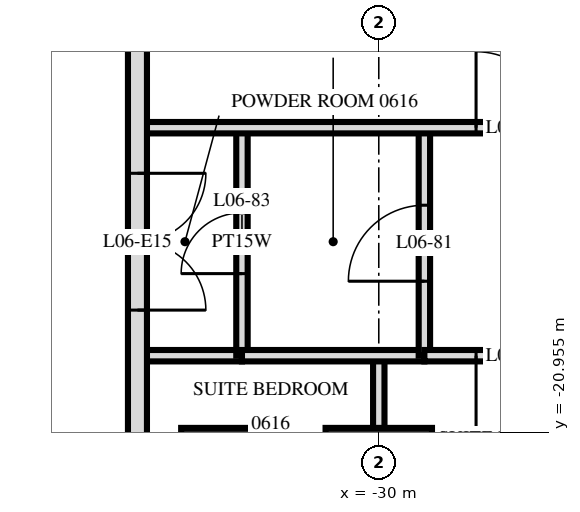
"""IFC4 building model, lengths in metres.
Left out: names, types, materials, properties, quantities, classifications, styles, units other than length and angle.
Written with IfcOpenShell. Run it as: python <this file> out.ifc"""

import sys

from ifc_helpers import new_model, si_unit, direction, frame, frame_2d, origin, origin_2d, place, context, subcontext, project, spatial, rectangle, extrude, element, fill, save


model = new_model("IFC4")
c1 = context("Model", 3, precision=1e-05, world=origin(), true_north=direction((0.0, 1.0)))
c2 = subcontext(c1, "Body", "Model", "MODEL_VIEW")
j1 = project(units=[si_unit("LENGTHUNIT", "METRE"), si_unit("PLANEANGLEUNIT", "RADIAN")], contexts=[c1])
p1 = place(None, origin())
s1 = spatial("IfcSite", under=j1, at=p1, CompositionType="ELEMENT")
p2 = place(p1, origin())
s2 = spatial("IfcBuilding", under=s1, at=p2, CompositionType="ELEMENT")
p3 = place(p2, frame((0.0, 0.0, 31.2)))
s3 = spatial("IfcBuildingStorey", under=s2, at=p3, CompositionType="ELEMENT", Elevation=31.2)
p4 = place(p3, frame((-32.1, -21.6, 0.0), z_axis=(0.0, 0.0, 1.0), x_axis=(0.0, 1.0, 0.0)))
e1 = element("IfcColumn", 1, at=p4, inside=s3, PredefinedType="COLUMN", context=c2, shape_type="SweptSolid", body=[
    extrude(rectangle(XDim=1.4, YDim=1.0, at=origin_2d()), origin(), (0.0, 0.0, 1.0), 3.6),
])
p5 = place(p3, frame((-30.0, -21.6, 0.0), z_axis=(0.0, 0.0, 1.0), x_axis=(1.0, 0.0, 0.0)))
e2 = element("IfcColumn", 2, at=p5, inside=s3, PredefinedType="COLUMN", context=c2, shape_type="SweptSolid", body=[
    extrude(rectangle(XDim=1.4, YDim=1.4, at=origin_2d()), origin(), (0.0, 0.0, 1.0), 3.6),
])
p6 = place(p3, frame((-33.175, -3.325, 0.0), z_axis=(0.0, 0.0, 1.0), x_axis=(0.0, -1.0, 0.0)))
e3 = element("IfcWall", 3, at=p6, inside=s3, PredefinedType="SOLIDWALL", context=c2, shape_type="SweptSolid", body=[
    extrude(rectangle(XDim=21.551, YDim=0.25, at=frame_2d((10.775, 0.0))), origin(), (0.0, 0.0, 1.0), 3.32),
])
p7 = place(p6, frame((7.025, 0.0, 0.0)))
e4 = element("IfcOpeningElement", 4, at=p7, cuts=e3, PredefinedType="OPENING", context=c2, shape_type="SweptSolid", body=[
    extrude(rectangle(XDim=1.8, YDim=2.4, at=frame_2d((0.9, 1.2))), frame((0.0, 0.135, 0.0), z_axis=(0.0, -1.0, 0.0), x_axis=(1.0, 0.0, 0.0)), (0.0, 0.0, 1.0), 0.27),
])
p8 = place(p6, frame((14.225, 0.0, 0.0)))
e5 = element("IfcOpeningElement", 5, at=p8, cuts=e3, PredefinedType="OPENING", context=c2, shape_type="SweptSolid", body=[
    extrude(rectangle(XDim=1.8, YDim=2.4, at=frame_2d((0.9, 1.2))), frame((0.0, 0.135, 0.0), z_axis=(0.0, -1.0, 0.0), x_axis=(1.0, 0.0, 0.0)), (0.0, 0.0, 1.0), 0.27),
])
p9 = place(p6, frame((18.875, 0.0, 0.0)))
e6 = element("IfcOpeningElement", 6, at=p9, cuts=e3, PredefinedType="OPENING", context=c2, shape_type="SweptSolid", body=[
    extrude(rectangle(XDim=1.8, YDim=2.4, at=frame_2d((0.9, 1.2))), frame((0.0, 0.135, 0.0), z_axis=(0.0, -1.0, 0.0), x_axis=(1.0, 0.0, 0.0)), (0.0, 0.0, 1.0), 0.27),
])
p10 = place(p3, frame((-29.4, -19.95, 0.0), z_axis=(0.0, 0.0, 1.0), x_axis=(0.0, 1.0, 0.0)))
e7 = element("IfcWall", 7, at=p10, inside=s3, PredefinedType="PARTITIONING", context=c2, shape_type="SweptSolid", body=[
    extrude(rectangle(XDim=3.0, YDim=0.15, at=frame_2d((1.5, 0.0))), origin(), (0.0, 0.0, 1.0), 3.32),
])
p11 = place(p10, frame((0.98, 0.0, 0.0)))
e8 = element("IfcOpeningElement", 8, at=p11, cuts=e7, PredefinedType="OPENING", context=c2, shape_type="SweptSolid", body=[
    extrude(rectangle(XDim=1.0, YDim=2.1, at=frame_2d((0.5, 1.05))), frame((0.0, 0.085, 0.0), z_axis=(0.0, -1.0, 0.0), x_axis=(1.0, 0.0, 0.0)), (0.0, 0.0, 1.0), 0.17),
])
p12 = place(p3, frame((-30.0, -28.978, 0.0), z_axis=(0.0, 0.0, 1.0), x_axis=(0.0, 1.0, 0.0)))
e9 = element("IfcWall", 9, at=p12, inside=s3, PredefinedType="PARTITIONING", context=c2, shape_type="SweptSolid", body=[
    extrude(rectangle(XDim=9.028, YDim=0.15, at=frame_2d((4.514, 0.0))), origin(), (0.0, 0.0, 1.0), 3.32),
])
p13 = place(p12, frame((3.987, 0.0, 0.0)))
e10 = element("IfcOpeningElement", 10, at=p13, cuts=e9, PredefinedType="OPENING", context=c2, shape_type="SweptSolid", body=[
    extrude(rectangle(XDim=0.9, YDim=2.1, at=frame_2d((0.45, 1.05))), frame((0.0, 0.085, 0.0), z_axis=(0.0, -1.0, 0.0), x_axis=(1.0, 0.0, 0.0)), (0.0, 0.0, 1.0), 0.17),
])
p14 = place(p3, frame((-31.8, -19.95, 0.0), z_axis=(0.0, 0.0, 1.0), x_axis=(0.0, 1.0, 0.0)))
e11 = element("IfcWall", 11, at=p14, inside=s3, PredefinedType="PLUMBINGWALL", context=c2, shape_type="SweptSolid", body=[
    extrude(rectangle(XDim=3.0, YDim=0.15, at=frame_2d((1.5, 0.0))), origin(), (0.0, 0.0, 1.0), 3.32),
])
p15 = place(p14, frame((1.08, 0.0, 0.0)))
e12 = element("IfcOpeningElement", 12, at=p15, cuts=e11, PredefinedType="OPENING", context=c2, shape_type="SweptSolid", body=[
    extrude(rectangle(XDim=0.8, YDim=2.1, at=frame_2d((0.4, 1.05))), frame((0.0, 0.085, 0.0), z_axis=(0.0, -1.0, 0.0), x_axis=(1.0, 0.0, 0.0)), (0.0, 0.0, 1.0), 0.17),
])
p16 = place(p3, frame((-29.4, -19.95, 0.0), z_axis=(0.0, 0.0, 1.0), x_axis=(1.0, 0.0, 0.0)))
e13 = element("IfcWall", 13, at=p16, inside=s3, PredefinedType="PARTITIONING", context=c2, shape_type="SweptSolid", body=[
    extrude(rectangle(XDim=2.4, YDim=0.15, at=frame_2d((1.2, 0.0))), origin(), (0.0, 0.0, 1.0), 3.32),
])
p17 = place(p16, frame((0.68, 0.0, 0.0)))
e14 = element("IfcOpeningElement", 14, at=p17, cuts=e13, PredefinedType="OPENING", context=c2, shape_type="SweptSolid", body=[
    extrude(rectangle(XDim=1.0, YDim=2.1, at=frame_2d((0.5, 1.05))), frame((0.0, 0.085, 0.0), z_axis=(0.0, -1.0, 0.0), x_axis=(1.0, 0.0, 0.0)), (0.0, 0.0, 1.0), 0.17),
])
p18 = place(p3, frame((-31.8, -19.95, 0.0), z_axis=(0.0, 0.0, 1.0), x_axis=(1.0, 0.0, 0.0)))
e15 = element("IfcWall", 15, at=p18, inside=s3, PredefinedType="PARTITIONING", context=c2, shape_type="SweptSolid", body=[
    extrude(rectangle(XDim=2.4, YDim=0.15, at=frame_2d((1.2, 0.0))), origin(), (0.0, 0.0, 1.0), 3.32),
])
p19 = place(p3, frame((-33.12, -19.95, 0.0), z_axis=(0.0, 0.0, 1.0), x_axis=(1.0, 0.0, 0.0)))
e16 = element("IfcWall", 16, at=p19, inside=s3, PredefinedType="PLUMBINGWALL", context=c2, shape_type="SweptSolid", body=[
    extrude(rectangle(XDim=1.32, YDim=0.15, at=frame_2d((0.66, 0.0))), origin(), (0.0, 0.0, 1.0), 3.32),
])
p20 = place(p3, frame((-33.12, -16.95, 0.0), z_axis=(0.0, 0.0, 1.0), x_axis=(1.0, 0.0, 0.0)))
e17 = element("IfcWall", 17, at=p20, inside=s3, PredefinedType="PARTITIONING", context=c2, shape_type="SweptSolid", body=[
    extrude(rectangle(XDim=66.24, YDim=0.15, at=frame_2d((33.12, 0.0))), origin(), (0.0, 0.0, 1.0), 3.32),
])
p21 = place(p20, frame((9.27, 0.0, 0.0)))
e18 = element("IfcOpeningElement", 18, at=p21, cuts=e17, PredefinedType="OPENING", context=c2, shape_type="SweptSolid", body=[
    extrude(rectangle(XDim=1.0, YDim=2.1, at=frame_2d((0.5, 1.05))), frame((0.0, 0.085, 0.0), z_axis=(0.0, -1.0, 0.0), x_axis=(1.0, 0.0, 0.0)), (0.0, 0.0, 1.0), 0.17),
])
p22 = place(p20, frame((13.97, 0.0, 0.0)))
e19 = element("IfcOpeningElement", 19, at=p22, cuts=e17, PredefinedType="OPENING", context=c2, shape_type="SweptSolid", body=[
    extrude(rectangle(XDim=1.0, YDim=2.1, at=frame_2d((0.5, 1.05))), frame((0.0, 0.085, 0.0), z_axis=(0.0, -1.0, 0.0), x_axis=(1.0, 0.0, 0.0)), (0.0, 0.0, 1.0), 0.17),
])
p23 = place(p20, frame((15.27, 0.0, 0.0)))
e20 = element("IfcOpeningElement", 20, at=p23, cuts=e17, PredefinedType="OPENING", context=c2, shape_type="SweptSolid", body=[
    extrude(rectangle(XDim=1.0, YDim=2.1, at=frame_2d((0.5, 1.05))), frame((0.0, 0.085, 0.0), z_axis=(0.0, -1.0, 0.0), x_axis=(1.0, 0.0, 0.0)), (0.0, 0.0, 1.0), 0.17),
])
p24 = place(p20, frame((19.97, 0.0, 0.0)))
e21 = element("IfcOpeningElement", 21, at=p24, cuts=e17, PredefinedType="OPENING", context=c2, shape_type="SweptSolid", body=[
    extrude(rectangle(XDim=1.0, YDim=2.1, at=frame_2d((0.5, 1.05))), frame((0.0, 0.085, 0.0), z_axis=(0.0, -1.0, 0.0), x_axis=(1.0, 0.0, 0.0)), (0.0, 0.0, 1.0), 0.17),
])
p25 = place(p20, frame((22.27, 0.0, 0.0)))
e22 = element("IfcOpeningElement", 22, at=p25, cuts=e17, PredefinedType="OPENING", context=c2, shape_type="SweptSolid", body=[
    extrude(rectangle(XDim=1.0, YDim=2.1, at=frame_2d((0.5, 1.05))), frame((0.0, 0.085, 0.0), z_axis=(0.0, -1.0, 0.0), x_axis=(1.0, 0.0, 0.0)), (0.0, 0.0, 1.0), 0.17),
])
p26 = place(p20, frame((28.97, 0.0, 0.0)))
e23 = element("IfcOpeningElement", 23, at=p26, cuts=e17, PredefinedType="OPENING", context=c2, shape_type="SweptSolid", body=[
    extrude(rectangle(XDim=1.0, YDim=2.1, at=frame_2d((0.5, 1.05))), frame((0.0, 0.085, 0.0), z_axis=(0.0, -1.0, 0.0), x_axis=(1.0, 0.0, 0.0)), (0.0, 0.0, 1.0), 0.17),
])
p27 = place(p20, frame((30.27, 0.0, 0.0)))
e24 = element("IfcOpeningElement", 24, at=p27, cuts=e17, PredefinedType="OPENING", context=c2, shape_type="SweptSolid", body=[
    extrude(rectangle(XDim=1.0, YDim=2.1, at=frame_2d((0.5, 1.05))), frame((0.0, 0.085, 0.0), z_axis=(0.0, -1.0, 0.0), x_axis=(1.0, 0.0, 0.0)), (0.0, 0.0, 1.0), 0.17),
])
p28 = place(p20, frame((34.97, 0.0, 0.0)))
e25 = element("IfcOpeningElement", 25, at=p28, cuts=e17, PredefinedType="OPENING", context=c2, shape_type="SweptSolid", body=[
    extrude(rectangle(XDim=1.0, YDim=2.1, at=frame_2d((0.5, 1.05))), frame((0.0, 0.085, 0.0), z_axis=(0.0, -1.0, 0.0), x_axis=(1.0, 0.0, 0.0)), (0.0, 0.0, 1.0), 0.17),
])
p29 = place(p20, frame((36.27, 0.0, 0.0)))
e26 = element("IfcOpeningElement", 26, at=p29, cuts=e17, PredefinedType="OPENING", context=c2, shape_type="SweptSolid", body=[
    extrude(rectangle(XDim=1.0, YDim=2.1, at=frame_2d((0.5, 1.05))), frame((0.0, 0.085, 0.0), z_axis=(0.0, -1.0, 0.0), x_axis=(1.0, 0.0, 0.0)), (0.0, 0.0, 1.0), 0.17),
])
p30 = place(p20, frame((40.97, 0.0, 0.0)))
e27 = element("IfcOpeningElement", 27, at=p30, cuts=e17, PredefinedType="OPENING", context=c2, shape_type="SweptSolid", body=[
    extrude(rectangle(XDim=1.0, YDim=2.1, at=frame_2d((0.5, 1.05))), frame((0.0, 0.085, 0.0), z_axis=(0.0, -1.0, 0.0), x_axis=(1.0, 0.0, 0.0)), (0.0, 0.0, 1.0), 0.17),
])
p31 = place(p20, frame((42.27, 0.0, 0.0)))
e28 = element("IfcOpeningElement", 28, at=p31, cuts=e17, PredefinedType="OPENING", context=c2, shape_type="SweptSolid", body=[
    extrude(rectangle(XDim=1.0, YDim=2.1, at=frame_2d((0.5, 1.05))), frame((0.0, 0.085, 0.0), z_axis=(0.0, -1.0, 0.0), x_axis=(1.0, 0.0, 0.0)), (0.0, 0.0, 1.0), 0.17),
])
p32 = place(p20, frame((46.97, 0.0, 0.0)))
e29 = element("IfcOpeningElement", 29, at=p32, cuts=e17, PredefinedType="OPENING", context=c2, shape_type="SweptSolid", body=[
    extrude(rectangle(XDim=1.0, YDim=2.1, at=frame_2d((0.5, 1.05))), frame((0.0, 0.085, 0.0), z_axis=(0.0, -1.0, 0.0), x_axis=(1.0, 0.0, 0.0)), (0.0, 0.0, 1.0), 0.17),
])
p33 = place(p20, frame((48.27, 0.0, 0.0)))
e30 = element("IfcOpeningElement", 30, at=p33, cuts=e17, PredefinedType="OPENING", context=c2, shape_type="SweptSolid", body=[
    extrude(rectangle(XDim=1.0, YDim=2.1, at=frame_2d((0.5, 1.05))), frame((0.0, 0.085, 0.0), z_axis=(0.0, -1.0, 0.0), x_axis=(1.0, 0.0, 0.0)), (0.0, 0.0, 1.0), 0.17),
])
p34 = place(p20, frame((52.97, 0.0, 0.0)))
e31 = element("IfcOpeningElement", 31, at=p34, cuts=e17, PredefinedType="OPENING", context=c2, shape_type="SweptSolid", body=[
    extrude(rectangle(XDim=1.0, YDim=2.1, at=frame_2d((0.5, 1.05))), frame((0.0, 0.085, 0.0), z_axis=(0.0, -1.0, 0.0), x_axis=(1.0, 0.0, 0.0)), (0.0, 0.0, 1.0), 0.17),
])
p35 = place(p20, frame((54.27, 0.0, 0.0)))
e32 = element("IfcOpeningElement", 32, at=p35, cuts=e17, PredefinedType="OPENING", context=c2, shape_type="SweptSolid", body=[
    extrude(rectangle(XDim=1.0, YDim=2.1, at=frame_2d((0.5, 1.05))), frame((0.0, 0.085, 0.0), z_axis=(0.0, -1.0, 0.0), x_axis=(1.0, 0.0, 0.0)), (0.0, 0.0, 1.0), 0.17),
])
p36 = place(p20, frame((4.4, 0.0, 0.0)))
e33 = element("IfcOpeningElement", 33, at=p36, cuts=e17, PredefinedType="OPENING", context=c2, shape_type="SweptSolid", body=[
    extrude(rectangle(XDim=1.0, YDim=2.1, at=frame_2d((0.5, 1.05))), frame((0.0, 0.085, 0.0), z_axis=(0.0, -1.0, 0.0), x_axis=(1.0, 0.0, 0.0)), (0.0, 0.0, 1.0), 0.17),
])
p37 = place(p20, frame((60.8, 0.0, 0.0)))
e34 = element("IfcOpeningElement", 34, at=p37, cuts=e17, PredefinedType="OPENING", context=c2, shape_type="SweptSolid", body=[
    extrude(rectangle(XDim=1.0, YDim=2.1, at=frame_2d((0.5, 1.05))), frame((0.0, 0.085, 0.0), z_axis=(0.0, -1.0, 0.0), x_axis=(1.0, 0.0, 0.0)), (0.0, 0.0, 1.0), 0.17),
])
p38 = place(p8, origin())
e35 = element("IfcDoor", 35, at=p38, inside=s3, OperationType="DOUBLE_DOOR_SINGLE_SWING", PredefinedType="DOOR", context=c2, shape_type="SweptSolid", body=[
    extrude(rectangle(XDim=1.8, YDim=2.4, at=frame_2d((0.9, 1.2))), frame((0.0, 0.025, 0.0), z_axis=(0.0, -1.0, 0.0), x_axis=(1.0, 0.0, 0.0)), (0.0, 0.0, 1.0), 0.05),
])
fill(e5, e35)
p39 = place(p36, origin())
e36 = element("IfcDoor", 36, at=p39, inside=s3, OperationType="SINGLE_SWING_RIGHT", PredefinedType="DOOR", context=c2, shape_type="SweptSolid", body=[
    extrude(rectangle(XDim=1.0, YDim=2.1, at=frame_2d((0.5, 1.05))), frame((0.0, 0.025, 0.0), z_axis=(0.0, -1.0, 0.0), x_axis=(1.0, 0.0, 0.0)), (0.0, 0.0, 1.0), 0.05),
])
fill(e33, e36)
p40 = place(p11, origin())
e37 = element("IfcDoor", 37, at=p40, inside=s3, OperationType="SINGLE_SWING_RIGHT", PredefinedType="DOOR", context=c2, shape_type="SweptSolid", body=[
    extrude(rectangle(XDim=1.0, YDim=2.1, at=frame_2d((0.5, 1.05))), frame((0.0, 0.025, 0.0), z_axis=(0.0, -1.0, 0.0), x_axis=(1.0, 0.0, 0.0)), (0.0, 0.0, 1.0), 0.05),
])
fill(e8, e37)
p41 = place(p17, frame((0.5, 0.0, 0.0), z_axis=(0.0, 0.0, 1.0), x_axis=(-1.0, 0.0, 0.0)))
e38 = element("IfcDoor", 38, at=p41, inside=s3, OperationType="SINGLE_SWING_LEFT", PredefinedType="DOOR", context=c2, shape_type="SweptSolid", body=[
    extrude(rectangle(XDim=1.0, YDim=2.1, at=frame_2d((0.0, 1.05))), frame((0.0, -0.025, 0.0), z_axis=(0.0, 1.0, 0.0), x_axis=(-1.0, 0.0, 0.0)), (0.0, 0.0, 1.0), 0.05),
])
fill(e14, e38)
p42 = place(p15, origin())
e39 = element("IfcDoor", 39, at=p42, inside=s3, OperationType="SINGLE_SWING_RIGHT", PredefinedType="DOOR", context=c2, shape_type="SweptSolid", body=[
    extrude(rectangle(XDim=0.8, YDim=2.1, at=frame_2d((0.4, 1.05))), frame((0.0, 0.025, 0.0), z_axis=(0.0, -1.0, 0.0), x_axis=(1.0, 0.0, 0.0)), (0.0, 0.0, 1.0), 0.05),
])
fill(e12, e39)
save(model, sys.argv[1])
